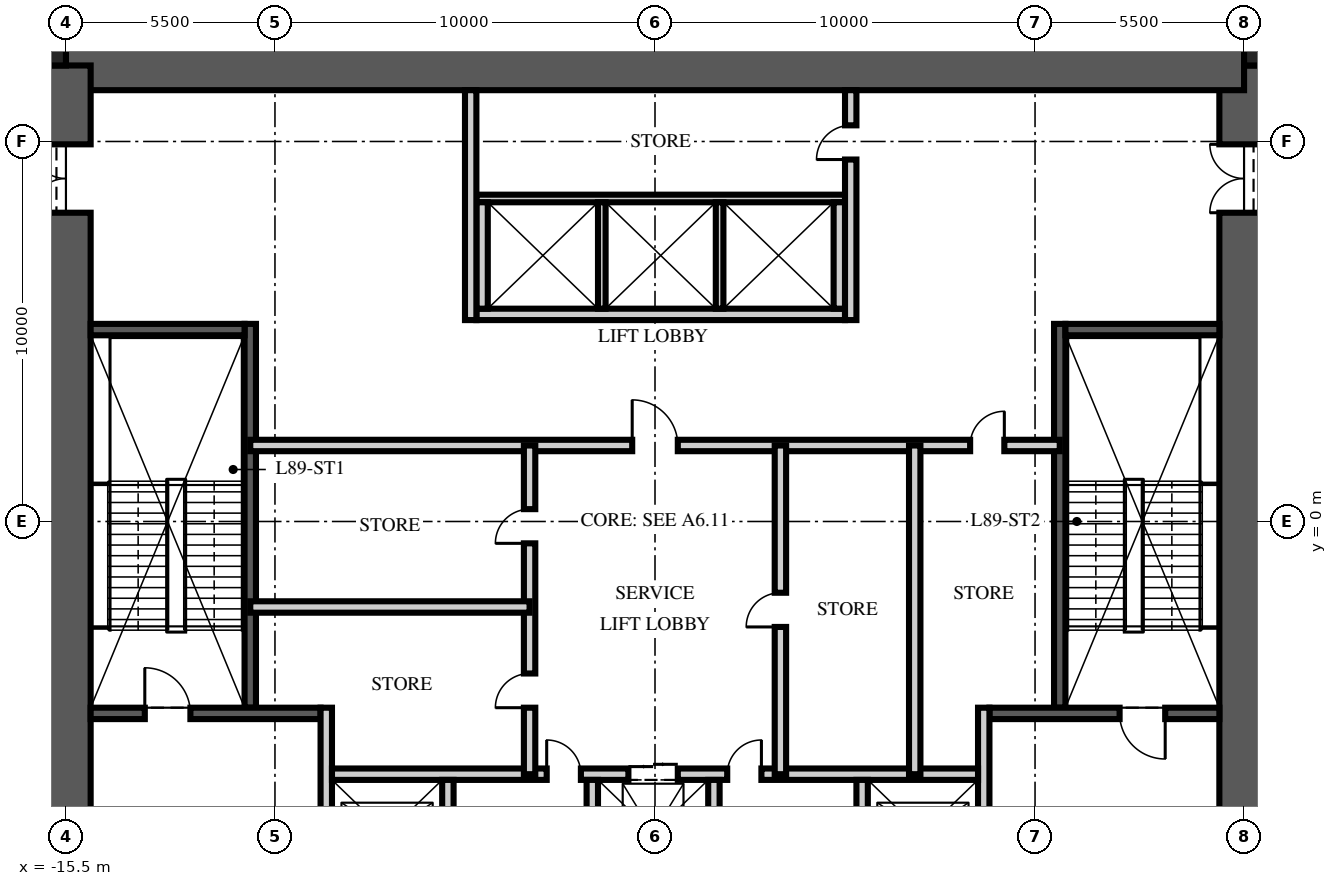
"""IFC4 building model, lengths in metres.
Left out: names, types, materials, properties, quantities, classifications, styles, units other than length and angle.
Written with IfcOpenShell. Run it as: python <this file> out.ifc"""

import sys

from ifc_helpers import new_model, si_unit, direction, frame, frame_2d, origin, origin_2d, place, context, subcontext, project, spatial, rectangle, extrude, element, fill, save


model = new_model("IFC4")
c1 = context("Model", 3, precision=1e-05, world=origin(), true_north=direction((0.0, 1.0)))
c2 = subcontext(c1, "Body", "Model", "MODEL_VIEW")
j1 = project(units=[si_unit("LENGTHUNIT", "METRE"), si_unit("PLANEANGLEUNIT", "RADIAN")], contexts=[c1])
p1 = place(None, origin())
s1 = spatial("IfcSite", under=j1, at=p1, CompositionType="ELEMENT")
p2 = place(p1, origin())
s2 = spatial("IfcBuilding", under=s1, at=p2, CompositionType="ELEMENT")
p3 = place(p2, frame((0.0, 0.0, 353.25)))
s3 = spatial("IfcBuildingStorey", under=s2, at=p3, CompositionType="ELEMENT", Elevation=353.25)
p4 = place(p3, frame((15.5, -12.0, -0.3), z_axis=(0.0, 0.0, 1.0), x_axis=(0.0, 1.0, 0.0)))
e1 = element("IfcWall", 1, at=p4, inside=s3, PredefinedType="SHEAR", context=c2, shape_type="SweptSolid", body=[
    extrude(rectangle(XDim=24.0, YDim=1.3, at=frame_2d((12.0, 0.0))), origin(), (0.0, 0.0, 1.0), 5.0),
])
p5 = place(p4, frame((2.675, 0.0, 0.3)))
e2 = element("IfcOpeningElement", 2, at=p5, cuts=e1, PredefinedType="OPENING", context=c2, shape_type="SweptSolid", body=[
    extrude(rectangle(XDim=1.2, YDim=2.1, at=frame_2d((0.6, 1.05))), frame((0.0, 0.66, 0.0), z_axis=(0.0, -1.0, 0.0), x_axis=(1.0, 0.0, 0.0)), (0.0, 0.0, 1.0), 1.32),
])
p6 = place(p4, frame((20.125, 0.0, 0.3)))
e3 = element("IfcOpeningElement", 3, at=p6, cuts=e1, PredefinedType="OPENING", context=c2, shape_type="SweptSolid", body=[
    extrude(rectangle(XDim=1.8, YDim=2.1, at=frame_2d((0.9, 1.05))), frame((0.0, 0.66, 0.0), z_axis=(0.0, -1.0, 0.0), x_axis=(1.0, 0.0, 0.0)), (0.0, 0.0, 1.0), 1.32),
])
p7 = place(p3, frame((-15.5, 12.0, -0.3), z_axis=(0.0, 0.0, 1.0), x_axis=(1.0, 0.0, 0.0)))
e4 = element("IfcWall", 4, at=p7, inside=s3, PredefinedType="SHEAR", context=c2, shape_type="SweptSolid", body=[
    extrude(rectangle(XDim=31.0, YDim=1.3, at=frame_2d((15.5, 0.0))), origin(), (0.0, 0.0, 1.0), 5.0),
])
p8 = place(p3, frame((-15.5, -12.0, -0.3), z_axis=(0.0, 0.0, 1.0), x_axis=(0.0, 1.0, 0.0)))
e5 = element("IfcWall", 5, at=p8, inside=s3, PredefinedType="SHEAR", context=c2, shape_type="SweptSolid", body=[
    extrude(rectangle(XDim=24.0, YDim=1.3, at=frame_2d((12.0, 0.0))), origin(), (0.0, 0.0, 1.0), 5.0),
])
p9 = place(p8, frame((2.675, 0.0, 0.3)))
e6 = element("IfcOpeningElement", 6, at=p9, cuts=e5, PredefinedType="OPENING", context=c2, shape_type="SweptSolid", body=[
    extrude(rectangle(XDim=1.2, YDim=2.1, at=frame_2d((0.6, 1.05))), frame((0.0, 0.66, 0.0), z_axis=(0.0, -1.0, 0.0), x_axis=(1.0, 0.0, 0.0)), (0.0, 0.0, 1.0), 1.32),
])
p10 = place(p8, frame((20.125, 0.0, 0.3)))
e7 = element("IfcOpeningElement", 7, at=p10, cuts=e5, PredefinedType="OPENING", context=c2, shape_type="SweptSolid", body=[
    extrude(rectangle(XDim=1.8, YDim=2.1, at=frame_2d((0.9, 1.05))), frame((0.0, 0.66, 0.0), z_axis=(0.0, -1.0, 0.0), x_axis=(1.0, 0.0, 0.0)), (0.0, 0.0, 1.0), 1.32),
])
for number, where, z_axis, x_axis in (
    (8, (15.825, 12.325, -0.3), (0.0, 0.0, 1.0), (1.0, 0.0, 0.0)),
    (9, (-15.825, 12.325, -0.3), (0.0, 0.0, 1.0), (1.0, 0.0, 0.0)),
):
    element("IfcColumn", number, at=place(p3, frame(where, z_axis=z_axis, x_axis=x_axis)), inside=s3, PredefinedType="COLUMN", context=c2, shape_type="SweptSolid", body=[
        extrude(rectangle(XDim=0.65, YDim=0.65, at=origin_2d()), origin(), (0.0, 0.0, 1.0), 5.0),
    ])
p11 = place(p3, frame((-10.65, -4.9, 0.0), z_axis=(0.0, 0.0, 1.0), x_axis=(0.0, 1.0, 0.0)))
e10 = element("IfcWall", 10, at=p11, inside=s3, PredefinedType="SOLIDWALL", context=c2, shape_type="SweptSolid", body=[
    extrude(rectangle(XDim=10.1, YDim=0.3, at=frame_2d((5.05, 0.0))), origin(), (0.0, 0.0, 1.0), 4.7),
])
p12 = place(p3, frame((-14.85, -5.05, 0.0), z_axis=(0.0, 0.0, 1.0), x_axis=(1.0, 0.0, 0.0)))
e11 = element("IfcWall", 11, at=p12, inside=s3, PredefinedType="SOLIDWALL", context=c2, shape_type="SweptSolid", body=[
    extrude(rectangle(XDim=6.05, YDim=0.3, at=frame_2d((3.025, 0.0))), origin(), (0.0, 0.0, 1.0), 4.7),
])
p13 = place(p12, frame((1.425, 0.0, 0.0)))
e12 = element("IfcOpeningElement", 12, at=p13, cuts=e11, PredefinedType="OPENING", context=c2, shape_type="SweptSolid", body=[
    extrude(rectangle(XDim=1.2, YDim=2.1, at=frame_2d((0.6, 1.05))), frame((0.0, 0.16, 0.0), z_axis=(0.0, -1.0, 0.0), x_axis=(1.0, 0.0, 0.0)), (0.0, 0.0, 1.0), 0.32),
])
p14 = place(p3, frame((-14.85, 5.05, 0.0), z_axis=(0.0, 0.0, 1.0), x_axis=(1.0, 0.0, 0.0)))
e13 = element("IfcWall", 13, at=p14, inside=s3, PredefinedType="SOLIDWALL", context=c2, shape_type="SweptSolid", body=[
    extrude(rectangle(XDim=4.05, YDim=0.3, at=frame_2d((2.025, 0.0))), origin(), (0.0, 0.0, 1.0), 4.7),
])
p15 = place(p3, frame((-8.65, -11.35, 0.0), z_axis=(0.0, 0.0, 1.0), x_axis=(0.0, 1.0, 0.0)))
e14 = element("IfcWall", 14, at=p15, inside=s3, PredefinedType="PARTITIONING", context=c2, shape_type="SweptSolid", body=[
    extrude(rectangle(XDim=6.45, YDim=0.3, at=frame_2d((3.225, 0.0))), origin(), (0.0, 0.0, 1.0), 4.7),
])
p16 = place(p15, frame((2.6, 0.0, 0.0)))
e15 = element("IfcOpeningElement", 15, at=p16, cuts=e14, PredefinedType="OPENING", context=c2, shape_type="SweptSolid", body=[
    extrude(rectangle(XDim=1.1, YDim=2.1, at=frame_2d((0.55, 1.05))), frame((0.0, 0.16, 0.0), z_axis=(0.0, -1.0, 0.0), x_axis=(1.0, 0.0, 0.0)), (0.0, 0.0, 1.0), 0.32),
])
p17 = place(p3, frame((10.65, -4.9, 0.0), z_axis=(0.0, 0.0, 1.0), x_axis=(0.0, 1.0, 0.0)))
e16 = element("IfcWall", 16, at=p17, inside=s3, PredefinedType="SOLIDWALL", context=c2, shape_type="SweptSolid", body=[
    extrude(rectangle(XDim=10.1, YDim=0.3, at=frame_2d((5.05, 0.0))), origin(), (0.0, 0.0, 1.0), 4.7),
])
p18 = place(p3, frame((14.85, -5.05, 0.0), z_axis=(0.0, 0.0, 1.0), x_axis=(-1.0, 0.0, 0.0)))
e17 = element("IfcWall", 17, at=p18, inside=s3, PredefinedType="SOLIDWALL", context=c2, shape_type="SweptSolid", body=[
    extrude(rectangle(XDim=6.05, YDim=0.3, at=frame_2d((3.025, 0.0))), origin(), (0.0, 0.0, 1.0), 4.7),
])
p19 = place(p18, frame((1.425, 0.0, 0.0)))
e18 = element("IfcOpeningElement", 18, at=p19, cuts=e17, PredefinedType="OPENING", context=c2, shape_type="SweptSolid", body=[
    extrude(rectangle(XDim=1.2, YDim=2.1, at=frame_2d((0.6, 1.05))), frame((0.0, 0.16, 0.0), z_axis=(0.0, -1.0, 0.0), x_axis=(1.0, 0.0, 0.0)), (0.0, 0.0, 1.0), 0.32),
])
p20 = place(p3, frame((14.85, 5.05, 0.0), z_axis=(0.0, 0.0, 1.0), x_axis=(-1.0, 0.0, 0.0)))
e19 = element("IfcWall", 19, at=p20, inside=s3, PredefinedType="SOLIDWALL", context=c2, shape_type="SweptSolid", body=[
    extrude(rectangle(XDim=4.05, YDim=0.3, at=frame_2d((2.025, 0.0))), origin(), (0.0, 0.0, 1.0), 4.7),
])
p21 = place(p3, frame((8.65, -11.35, 0.0), z_axis=(0.0, 0.0, 1.0), x_axis=(0.0, 1.0, 0.0)))
e20 = element("IfcWall", 20, at=p21, inside=s3, PredefinedType="PARTITIONING", context=c2, shape_type="SweptSolid", body=[
    extrude(rectangle(XDim=6.45, YDim=0.3, at=frame_2d((3.225, 0.0))), origin(), (0.0, 0.0, 1.0), 4.7),
])
p22 = place(p21, frame((2.6, 0.0, 0.0)))
e21 = element("IfcOpeningElement", 21, at=p22, cuts=e20, PredefinedType="OPENING", context=c2, shape_type="SweptSolid", body=[
    extrude(rectangle(XDim=1.1, YDim=2.1, at=frame_2d((0.55, 1.05))), frame((0.0, 0.16, 0.0), z_axis=(0.0, -1.0, 0.0), x_axis=(1.0, 0.0, 0.0)), (0.0, 0.0, 1.0), 0.32),
])
p23 = place(p3, frame((-8.5, -6.65, 0.0), z_axis=(0.0, 0.0, 1.0), x_axis=(1.0, 0.0, 0.0)))
e22 = element("IfcWall", 22, at=p23, inside=s3, PredefinedType="PARTITIONING", context=c2, shape_type="SweptSolid", body=[
    extrude(rectangle(XDim=17.0, YDim=0.3, at=frame_2d((8.5, 0.0))), origin(), (0.0, 0.0, 1.0), 4.7),
])
p24 = place(p23, frame((7.8, 0.0, 0.0)))
e23 = element("IfcOpeningElement", 23, at=p24, cuts=e22, PredefinedType="OPENING", context=c2, shape_type="SweptSolid", body=[
    extrude(rectangle(XDim=1.3, YDim=2.4, at=frame_2d((0.65, 1.2))), frame((0.0, 0.16, 0.0), z_axis=(0.0, -1.0, 0.0), x_axis=(1.0, 0.0, 0.0)), (0.0, 0.0, 1.0), 0.32),
])
p25 = place(p23, frame((5.65, 0.0, 0.0)))
e24 = element("IfcOpeningElement", 24, at=p25, cuts=e22, PredefinedType="OPENING", context=c2, shape_type="SweptSolid", body=[
    extrude(rectangle(XDim=0.9, YDim=2.1, at=frame_2d((0.45, 1.05))), frame((0.0, 0.16, 0.0), z_axis=(0.0, -1.0, 0.0), x_axis=(1.0, 0.0, 0.0)), (0.0, 0.0, 1.0), 0.32),
])
p26 = place(p23, frame((10.4, 0.0, 0.0)))
e25 = element("IfcOpeningElement", 25, at=p26, cuts=e22, PredefinedType="OPENING", context=c2, shape_type="SweptSolid", body=[
    extrude(rectangle(XDim=0.9, YDim=2.1, at=frame_2d((0.45, 1.05))), frame((0.0, 0.16, 0.0), z_axis=(0.0, -1.0, 0.0), x_axis=(1.0, 0.0, 0.0)), (0.0, 0.0, 1.0), 0.32),
])
for number, where, z_axis, x_axis in (
    (26, (-5.45, -11.35, 0.0), (0.0, 0.0, 1.0), (0.0, 1.0, 0.0)),
    (27, (-1.65, -11.35, 0.0), (0.0, 0.0, 1.0), (0.0, 1.0, 0.0)),
    (28, (1.55, -11.35, 0.0), (0.0, 0.0, 1.0), (0.0, 1.0, 0.0)),
    (29, (5.45, -11.35, 0.0), (0.0, 0.0, 1.0), (0.0, 1.0, 0.0)),
):
    element("IfcWall", number, at=place(p3, frame(where, z_axis=z_axis, x_axis=x_axis)), inside=s3, PredefinedType="PARTITIONING", context=c2, shape_type="SweptSolid", body=[
        extrude(rectangle(XDim=4.55, YDim=0.3, at=frame_2d((2.275, 0.0))), origin(), (0.0, 0.0, 1.0), 4.7),
    ])
p27 = place(p3, frame((-4.7, 5.45, 0.0), z_axis=(0.0, 0.0, 1.0), x_axis=(1.0, 0.0, 0.0)))
e30 = element("IfcWall", 30, at=p27, inside=s3, PredefinedType="PARTITIONING", context=c2, shape_type="SweptSolid", body=[
    extrude(rectangle(XDim=9.7, YDim=0.3, at=frame_2d((4.85, 0.0))), origin(), (0.0, 0.0, 1.0), 4.7),
])
p28 = place(p3, frame((-4.7, 8.5, 0.0), z_axis=(0.0, 0.0, 1.0), x_axis=(1.0, 0.0, 0.0)))
e31 = element("IfcWall", 31, at=p28, inside=s3, PredefinedType="PARTITIONING", context=c2, shape_type="SweptSolid", body=[
    extrude(rectangle(XDim=9.7, YDim=0.2, at=frame_2d((4.85, 0.0))), origin(), (0.0, 0.0, 1.0), 4.7),
])
for number, where, z_axis, x_axis in (
    (32, (-4.55, 5.6, 0.0), (0.0, 0.0, 1.0), (0.0, 1.0, 0.0)),
    (33, (4.85, 5.6, 0.0), (0.0, 0.0, 1.0), (0.0, 1.0, 0.0)),
):
    element("IfcWall", number, at=place(p3, frame(where, z_axis=z_axis, x_axis=x_axis)), inside=s3, PredefinedType="PARTITIONING", context=c2, shape_type="SweptSolid", body=[
        extrude(rectangle(XDim=2.8, YDim=0.3, at=frame_2d((1.4, 0.0))), origin(), (0.0, 0.0, 1.0), 4.7),
    ])
for number, where, z_axis, x_axis in (
    (34, (-1.4, 5.6, 0.0), (0.0, 0.0, 1.0), (0.0, 1.0, 0.0)),
    (35, (1.7, 5.6, 0.0), (0.0, 0.0, 1.0), (0.0, 1.0, 0.0)),
):
    element("IfcWall", number, at=place(p3, frame(where, z_axis=z_axis, x_axis=x_axis)), inside=s3, PredefinedType="PARTITIONING", context=c2, shape_type="SweptSolid", body=[
        extrude(rectangle(XDim=2.8, YDim=0.2, at=frame_2d((1.4, 0.0))), origin(), (0.0, 0.0, 1.0), 4.7),
    ])
p29 = place(p3, frame((-10.65, 2.0, 0.0), z_axis=(0.0, 0.0, 1.0), x_axis=(1.0, 0.0, 0.0)))
e36 = element("IfcWall", 36, at=p29, inside=s3, PredefinedType="PARTITIONING", context=c2, shape_type="SweptSolid", body=[
    extrude(rectangle(XDim=21.3, YDim=0.3, at=frame_2d((10.65, 0.0))), origin(), (0.0, 0.0, 1.0), 4.7),
])
p30 = place(p29, frame((10.05, 0.0, 0.0)))
e37 = element("IfcOpeningElement", 37, at=p30, cuts=e36, PredefinedType="OPENING", context=c2, shape_type="SweptSolid", body=[
    extrude(rectangle(XDim=1.2, YDim=2.1, at=frame_2d((0.6, 1.05))), frame((0.0, 0.16, 0.0), z_axis=(0.0, -1.0, 0.0), x_axis=(1.0, 0.0, 0.0)), (0.0, 0.0, 1.0), 0.32),
])
p31 = place(p29, frame((18.942, 0.0, 0.0)))
e38 = element("IfcOpeningElement", 38, at=p31, cuts=e36, PredefinedType="OPENING", context=c2, shape_type="SweptSolid", body=[
    extrude(rectangle(XDim=0.9, YDim=2.1, at=frame_2d((0.45, 1.05))), frame((0.0, 0.16, 0.0), z_axis=(0.0, -1.0, 0.0), x_axis=(1.0, 0.0, 0.0)), (0.0, 0.0, 1.0), 0.32),
])
p32 = place(p3, frame((-3.3, -6.65, 0.0), z_axis=(0.0, 0.0, 1.0), x_axis=(0.0, 1.0, 0.0)))
e39 = element("IfcWall", 39, at=p32, inside=s3, PredefinedType="PARTITIONING", context=c2, shape_type="SweptSolid", body=[
    extrude(rectangle(XDim=8.65, YDim=0.3, at=frame_2d((4.325, 0.0))), origin(), (0.0, 0.0, 1.0), 4.7),
])
p33 = place(p32, frame((1.75, 0.0, 0.0)))
e40 = element("IfcOpeningElement", 40, at=p33, cuts=e39, PredefinedType="OPENING", context=c2, shape_type="SweptSolid", body=[
    extrude(rectangle(XDim=0.9, YDim=2.1, at=frame_2d((0.45, 1.05))), frame((0.0, 0.16, 0.0), z_axis=(0.0, -1.0, 0.0), x_axis=(1.0, 0.0, 0.0)), (0.0, 0.0, 1.0), 0.32),
])
p34 = place(p32, frame((6.075, 0.0, 0.0)))
e41 = element("IfcOpeningElement", 41, at=p34, cuts=e39, PredefinedType="OPENING", context=c2, shape_type="SweptSolid", body=[
    extrude(rectangle(XDim=0.9, YDim=2.1, at=frame_2d((0.45, 1.05))), frame((0.0, 0.16, 0.0), z_axis=(0.0, -1.0, 0.0), x_axis=(1.0, 0.0, 0.0)), (0.0, 0.0, 1.0), 0.32),
])
p35 = place(p3, frame((3.3, -6.65, 0.0), z_axis=(0.0, 0.0, 1.0), x_axis=(0.0, 1.0, 0.0)))
e42 = element("IfcWall", 42, at=p35, inside=s3, PredefinedType="PARTITIONING", context=c2, shape_type="SweptSolid", body=[
    extrude(rectangle(XDim=8.65, YDim=0.3, at=frame_2d((4.325, 0.0))), origin(), (0.0, 0.0, 1.0), 4.7),
])
p36 = place(p35, frame((3.875, 0.0, 0.0)))
e43 = element("IfcOpeningElement", 43, at=p36, cuts=e42, PredefinedType="OPENING", context=c2, shape_type="SweptSolid", body=[
    extrude(rectangle(XDim=0.9, YDim=2.1, at=frame_2d((0.45, 1.05))), frame((0.0, 0.16, 0.0), z_axis=(0.0, -1.0, 0.0), x_axis=(1.0, 0.0, 0.0)), (0.0, 0.0, 1.0), 0.32),
])
p37 = place(p3, frame((-10.65, -2.25, 0.0), z_axis=(0.0, 0.0, 1.0), x_axis=(1.0, 0.0, 0.0)))
e44 = element("IfcWall", 44, at=p37, inside=s3, PredefinedType="PARTITIONING", context=c2, shape_type="SweptSolid", body=[
    extrude(rectangle(XDim=7.35, YDim=0.3, at=frame_2d((3.675, 0.0))), origin(), (0.0, 0.0, 1.0), 4.7),
])
p38 = place(p3, frame((6.834, -6.65, 0.0), z_axis=(0.0, 0.0, 1.0), x_axis=(0.0, 1.0, 0.0)))
e45 = element("IfcWall", 45, at=p38, inside=s3, PredefinedType="PARTITIONING", context=c2, shape_type="SweptSolid", body=[
    extrude(rectangle(XDim=8.65, YDim=0.3, at=frame_2d((4.325, 0.0))), origin(), (0.0, 0.0, 1.0), 4.7),
])
p39 = place(p3, frame((-4.85, 5.3, 0.0), z_axis=(0.0, 0.0, 1.0), x_axis=(0.0, 1.0, 0.0)))
e46 = element("IfcWall", 46, at=p39, inside=s3, PredefinedType="PARTITIONING", context=c2, shape_type="SweptSolid", body=[
    extrude(rectangle(XDim=6.05, YDim=0.3, at=frame_2d((3.025, 0.0))), origin(), (0.0, 0.0, 1.0), 4.7),
])
p40 = place(p3, frame((5.15, 5.3, 0.0), z_axis=(0.0, 0.0, 1.0), x_axis=(0.0, 1.0, 0.0)))
e47 = element("IfcWall", 47, at=p40, inside=s3, PredefinedType="PARTITIONING", context=c2, shape_type="SweptSolid", body=[
    extrude(rectangle(XDim=6.05, YDim=0.3, at=frame_2d((3.025, 0.0))), origin(), (0.0, 0.0, 1.0), 4.7),
])
p41 = place(p40, frame((4.225, 0.0, 0.0)))
e48 = element("IfcOpeningElement", 48, at=p41, cuts=e47, PredefinedType="OPENING", context=c2, shape_type="SweptSolid", body=[
    extrude(rectangle(XDim=0.9, YDim=2.1, at=frame_2d((0.45, 1.05))), frame((0.0, 0.16, 0.0), z_axis=(0.0, -1.0, 0.0), x_axis=(1.0, 0.0, 0.0)), (0.0, 0.0, 1.0), 0.32),
])
p42 = place(p13, origin())
e49 = element("IfcDoor", 49, at=p42, inside=s3, OperationType="SINGLE_SWING_LEFT", PredefinedType="DOOR", context=c2, shape_type="SweptSolid", body=[
    extrude(rectangle(XDim=1.2, YDim=2.1, at=frame_2d((0.6, 1.05))), frame((0.0, 0.025, 0.0), z_axis=(0.0, -1.0, 0.0), x_axis=(1.0, 0.0, 0.0)), (0.0, 0.0, 1.0), 0.05),
])
fill(e12, e49)
p43 = place(p10, origin())
e50 = element("IfcDoor", 50, at=p43, inside=s3, OperationType="DOUBLE_DOOR_SINGLE_SWING", PredefinedType="DOOR", context=c2, shape_type="SweptSolid", body=[
    extrude(rectangle(XDim=1.8, YDim=2.1, at=frame_2d((0.9, 1.05))), frame((0.0, 0.025, 0.0), z_axis=(0.0, -1.0, 0.0), x_axis=(1.0, 0.0, 0.0)), (0.0, 0.0, 1.0), 0.05),
])
fill(e7, e50)
p44 = place(p19, origin())
e51 = element("IfcDoor", 51, at=p44, inside=s3, OperationType="SINGLE_SWING_LEFT", PredefinedType="DOOR", context=c2, shape_type="SweptSolid", body=[
    extrude(rectangle(XDim=1.2, YDim=2.1, at=frame_2d((0.6, 1.05))), frame((0.0, 0.025, 0.0), z_axis=(0.0, -1.0, 0.0), x_axis=(1.0, 0.0, 0.0)), (0.0, 0.0, 1.0), 0.05),
])
fill(e18, e51)
p45 = place(p6, origin())
e52 = element("IfcDoor", 52, at=p45, inside=s3, OperationType="DOUBLE_DOOR_SINGLE_SWING", PredefinedType="DOOR", context=c2, shape_type="SweptSolid", body=[
    extrude(rectangle(XDim=1.8, YDim=2.1, at=frame_2d((0.9, 1.05))), frame((0.0, 0.025, 0.0), z_axis=(0.0, -1.0, 0.0), x_axis=(1.0, 0.0, 0.0)), (0.0, 0.0, 1.0), 0.05),
])
fill(e3, e52)
p46 = place(p24, origin())
e53 = element("IfcDoor", 53, at=p46, inside=s3, OperationType="DOUBLE_DOOR_SLIDING", PredefinedType="DOOR", context=c2, shape_type="SweptSolid", body=[
    extrude(rectangle(XDim=1.3, YDim=2.4, at=frame_2d((0.65, 1.2))), frame((0.0, 0.025, 0.0), z_axis=(0.0, -1.0, 0.0), x_axis=(1.0, 0.0, 0.0)), (0.0, 0.0, 1.0), 0.05),
])
fill(e23, e53)
p47 = place(p30, origin())
e54 = element("IfcDoor", 54, at=p47, inside=s3, OperationType="SINGLE_SWING_LEFT", PredefinedType="DOOR", context=c2, shape_type="SweptSolid", body=[
    extrude(rectangle(XDim=1.2, YDim=2.1, at=frame_2d((0.6, 1.05))), frame((0.0, 0.025, 0.0), z_axis=(0.0, -1.0, 0.0), x_axis=(1.0, 0.0, 0.0)), (0.0, 0.0, 1.0), 0.05),
])
fill(e37, e54)
p48 = place(p25, origin())
e55 = element("IfcDoor", 55, at=p48, inside=s3, OperationType="SINGLE_SWING_LEFT", PredefinedType="DOOR", context=c2, shape_type="SweptSolid", body=[
    extrude(rectangle(XDim=0.9, YDim=2.1, at=frame_2d((0.45, 1.05))), frame((0.0, 0.025, 0.0), z_axis=(0.0, -1.0, 0.0), x_axis=(1.0, 0.0, 0.0)), (0.0, 0.0, 1.0), 0.05),
])
fill(e24, e55)
p49 = place(p26, origin())
e56 = element("IfcDoor", 56, at=p49, inside=s3, OperationType="SINGLE_SWING_RIGHT", PredefinedType="DOOR", context=c2, shape_type="SweptSolid", body=[
    extrude(rectangle(XDim=0.9, YDim=2.1, at=frame_2d((0.45, 1.05))), frame((0.0, 0.025, 0.0), z_axis=(0.0, -1.0, 0.0), x_axis=(1.0, 0.0, 0.0)), (0.0, 0.0, 1.0), 0.05),
])
fill(e25, e56)
p50 = place(p33, origin())
e57 = element("IfcDoor", 57, at=p50, inside=s3, OperationType="SINGLE_SWING_LEFT", PredefinedType="DOOR", context=c2, shape_type="SweptSolid", body=[
    extrude(rectangle(XDim=0.9, YDim=2.1, at=frame_2d((0.45, 1.05))), frame((0.0, 0.025, 0.0), z_axis=(0.0, -1.0, 0.0), x_axis=(1.0, 0.0, 0.0)), (0.0, 0.0, 1.0), 0.05),
])
fill(e40, e57)
p51 = place(p34, origin())
e58 = element("IfcDoor", 58, at=p51, inside=s3, OperationType="SINGLE_SWING_LEFT", PredefinedType="DOOR", context=c2, shape_type="SweptSolid", body=[
    extrude(rectangle(XDim=0.9, YDim=2.1, at=frame_2d((0.45, 1.05))), frame((0.0, 0.025, 0.0), z_axis=(0.0, -1.0, 0.0), x_axis=(1.0, 0.0, 0.0)), (0.0, 0.0, 1.0), 0.05),
])
fill(e41, e58)
p52 = place(p36, origin())
e59 = element("IfcDoor", 59, at=p52, inside=s3, OperationType="SINGLE_SWING_LEFT", PredefinedType="DOOR", context=c2, shape_type="SweptSolid", body=[
    extrude(rectangle(XDim=0.9, YDim=2.1, at=frame_2d((0.45, 1.05))), frame((0.0, 0.025, 0.0), z_axis=(0.0, -1.0, 0.0), x_axis=(1.0, 0.0, 0.0)), (0.0, 0.0, 1.0), 0.05),
])
fill(e43, e59)
p53 = place(p31, origin())
e60 = element("IfcDoor", 60, at=p53, inside=s3, OperationType="SINGLE_SWING_RIGHT", PredefinedType="DOOR", context=c2, shape_type="SweptSolid", body=[
    extrude(rectangle(XDim=0.9, YDim=2.1, at=frame_2d((0.45, 1.05))), frame((0.0, 0.025, 0.0), z_axis=(0.0, -1.0, 0.0), x_axis=(1.0, 0.0, 0.0)), (0.0, 0.0, 1.0), 0.05),
])
fill(e38, e60)
p54 = place(p41, origin())
e61 = element("IfcDoor", 61, at=p54, inside=s3, OperationType="SINGLE_SWING_LEFT", PredefinedType="DOOR", context=c2, shape_type="SweptSolid", body=[
    extrude(rectangle(XDim=0.9, YDim=2.1, at=frame_2d((0.45, 1.05))), frame((0.0, 0.025, 0.0), z_axis=(0.0, -1.0, 0.0), x_axis=(1.0, 0.0, 0.0)), (0.0, 0.0, 1.0), 0.05),
])
fill(e48, e61)
save(model, sys.argv[1])
